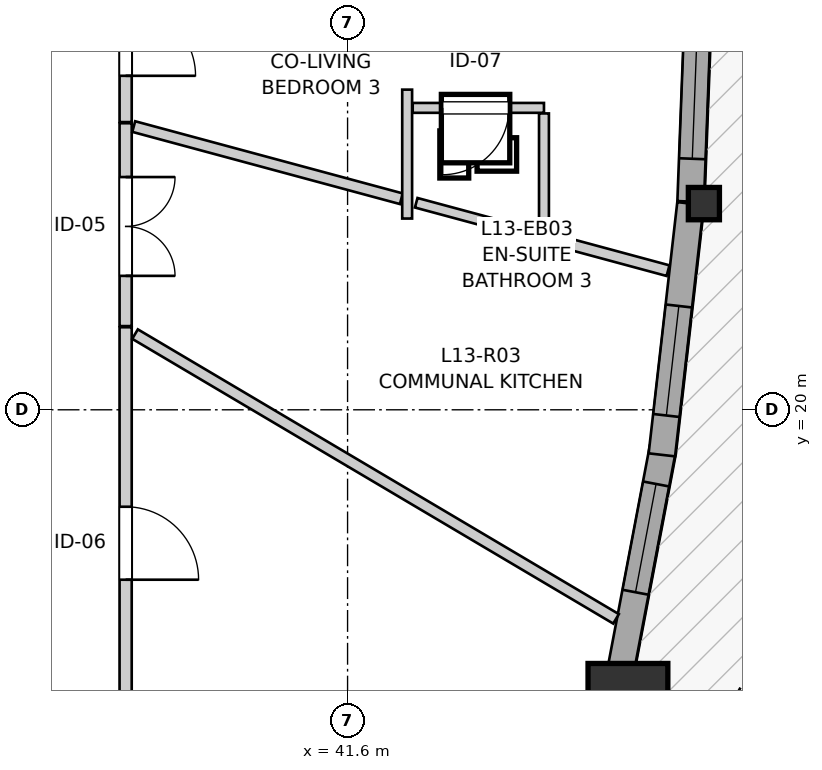
"""IFC4 building model, lengths in metres.
Left out: names, types, materials, properties, quantities, classifications, styles, units other than length and angle.
Written with IfcOpenShell. Run it as: python <this file> out.ifc"""

import sys

from ifc_helpers import new_model, si_unit, direction, frame, frame_2d, origin, origin_2d, place, context, subcontext, project, spatial, rectangle, i_section, extrude, source, transform, mapped, element, fill, save


model = new_model("IFC4")
c1 = context("Model", 3, precision=1e-05, world=origin(), true_north=direction((0.0, 1.0)))
c2 = subcontext(c1, "Body", "Model", "MODEL_VIEW")
j1 = project(units=[si_unit("LENGTHUNIT", "METRE"), si_unit("PLANEANGLEUNIT", "RADIAN")], contexts=[c1])
p1 = place(None, origin())
s1 = spatial("IfcSite", under=j1, at=p1, CompositionType="ELEMENT")
p2 = place(p1, origin())
s2 = spatial("IfcBuilding", under=s1, at=p2, CompositionType="ELEMENT")
p3 = place(p2, frame((0.0, 0.0, 46.2)))
s3 = spatial("IfcBuildingStorey", under=s2, at=p3, CompositionType="ELEMENT", Elevation=46.2)
m1 = source(origin(), c2, "Body", "SweptSolid", [
    extrude(rectangle(XDim=1.05, YDim=1.05, at=origin_2d()), origin(), (0.0, 0.0, 1.0), 2.94),
])
p4 = place(p3, frame((45.289, 16.138, 0.0), z_axis=(0.0, 0.0, 1.0), x_axis=(1.0, 0.0, 0.0)))
e1 = element("IfcColumn", 1, at=p4, inside=s3, PredefinedType="COLUMN", context=c2, shape_type="MappedRepresentation", body=[
    mapped(m1, transform((0.0, 0.0, 0.0), x_axis=(1.0, 0.0, 0.0), y_axis=(0.0, 1.0, 0.0), z_axis=(0.0, 0.0, 1.0), scale=1.0)),
])
m2 = source(origin(), c2, "Body", "SweptSolid", [
    extrude(i_section(OverallWidth=0.409, OverallDepth=0.425, WebThickness=0.03, FlangeThickness=0.048, FilletRadius=0.015, at=origin_2d()), origin(), (0.0, 0.0, 1.0), 2.94),
])
p5 = place(p3, frame((46.288, 22.713, 0.0), z_axis=(0.0, 0.0, 1.0), x_axis=(1.0, 0.0, 0.0)))
e2 = element("IfcColumn", 2, at=p5, inside=s3, PredefinedType="PILASTER", context=c2, shape_type="MappedRepresentation", body=[
    mapped(m2, transform((0.0, 0.0, 0.0), x_axis=(1.0, 0.0, 0.0), y_axis=(0.0, 1.0, 0.0), z_axis=(0.0, 0.0, 1.0), scale=1.0)),
])
p6 = place(p3, frame((45.173, 16.465, 0.0), z_axis=(0.0, 0.0, 1.0), x_axis=(0.186653769851, 0.982425758111, 0.0)))
e3 = element("IfcWall", 3, at=p6, inside=s3, PredefinedType="SOLIDWALL", context=c2, shape_type="SweptSolid", body=[
    extrude(rectangle(XDim=3.084, YDim=0.35, at=frame_2d((1.542, 0.0))), origin(), (0.0, 0.0, 1.0), 2.42),
])
p7 = place(p6, frame((1.155, 0.0, 0.82)))
e4 = element("IfcOpeningElement", 4, at=p7, cuts=e3, PredefinedType="OPENING", context=c2, shape_type="SweptSolid", body=[
    extrude(rectangle(XDim=1.45, YDim=1.25, at=frame_2d((0.725, 0.625))), frame((0.0, 0.185, 0.0), z_axis=(0.0, -1.0, 0.0), x_axis=(1.0, 0.0, 0.0)), (0.0, 0.0, 1.0), 0.37),
])
p8 = place(p3, frame((45.735, 19.407, 0.0), z_axis=(0.0, 0.0, 1.0), x_axis=(0.113314766684, 0.993559139484, 0.0)))
e5 = element("IfcWall", 5, at=p8, inside=s3, PredefinedType="SOLIDWALL", context=c2, shape_type="SweptSolid", body=[
    extrude(rectangle(XDim=3.327, YDim=0.35, at=frame_2d((1.663, 0.0))), origin(), (0.0, 0.0, 1.0), 2.42),
])
p9 = place(p8, frame((0.521, 0.0, 0.82)))
e6 = element("IfcOpeningElement", 6, at=p9, cuts=e5, PredefinedType="OPENING", context=c2, shape_type="SweptSolid", body=[
    extrude(rectangle(XDim=1.45, YDim=1.25, at=frame_2d((0.725, 0.625))), frame((0.0, 0.185, 0.0), z_axis=(0.0, -1.0, 0.0), x_axis=(1.0, 0.0, 0.0)), (0.0, 0.0, 1.0), 0.37),
])
p10 = place(p3, frame((46.114, 22.739, 0.0), z_axis=(0.0, 0.0, 1.0), x_axis=(0.038010770715, 0.999277329529, 0.0)))
e7 = element("IfcWall", 7, at=p10, inside=s3, PredefinedType="SOLIDWALL", context=c2, shape_type="SweptSolid", body=[
    extrude(rectangle(XDim=3.308, YDim=0.35, at=frame_2d((1.654, 0.0))), origin(), (0.0, 0.0, 1.0), 2.42),
])
p11 = place(p10, frame((0.564, 0.0, 0.82)))
e8 = element("IfcOpeningElement", 8, at=p11, cuts=e7, PredefinedType="OPENING", context=c2, shape_type="SweptSolid", body=[
    extrude(rectangle(XDim=2.1, YDim=1.4, at=frame_2d((1.05, 0.7))), frame((0.0, 0.185, 0.0), z_axis=(0.0, -1.0, 0.0), x_axis=(1.0, 0.0, 0.0)), (0.0, 0.0, 1.0), 0.37),
])
p12 = place(p3, frame((38.68, 21.086, 0.0), z_axis=(0.0, 0.0, 1.0), x_axis=(0.0, -1.0, 0.0)))
e9 = element("IfcWall", 9, at=p12, inside=s3, PredefinedType="PARTITIONING", context=c2, shape_type="SweptSolid", body=[
    extrude(rectangle(XDim=5.666, YDim=0.16, at=frame_2d((2.833, 0.0))), origin(), (0.0, 0.0, 1.0), 2.94),
])
p13 = place(p12, frame((2.362, 0.0, 0.0)))
e10 = element("IfcOpeningElement", 10, at=p13, cuts=e9, PredefinedType="OPENING", context=c2, shape_type="SweptSolid", body=[
    extrude(rectangle(XDim=0.96, YDim=2.1, at=frame_2d((0.48, 1.05))), frame((0.0, 0.09, 0.0), z_axis=(0.0, -1.0, 0.0), x_axis=(1.0, 0.0, 0.0)), (0.0, 0.0, 1.0), 0.18),
])
p14 = place(p3, frame((38.68, 23.77, 0.0), z_axis=(0.0, 0.0, 1.0), x_axis=(0.0, -1.0, 0.0)))
e11 = element("IfcWall", 11, at=p14, inside=s3, PredefinedType="PARTITIONING", context=c2, shape_type="SweptSolid", body=[
    extrude(rectangle(XDim=2.669, YDim=0.16, at=frame_2d((1.334, 0.0))), origin(), (0.0, 0.0, 1.0), 2.94),
])
p15 = place(p14, frame((0.708, 0.0, 0.0)))
e12 = element("IfcOpeningElement", 12, at=p15, cuts=e11, PredefinedType="OPENING", context=c2, shape_type="SweptSolid", body=[
    extrude(rectangle(XDim=1.3, YDim=2.1, at=frame_2d((0.65, 1.05))), frame((0.0, 0.09, 0.0), z_axis=(0.0, -1.0, 0.0), x_axis=(1.0, 0.0, 0.0)), (0.0, 0.0, 1.0), 0.18),
])
p16 = place(p3, frame((38.68, 25.968, 0.0), z_axis=(0.0, 0.0, 1.0), x_axis=(0.0, -1.0, 0.0)))
e13 = element("IfcWall", 13, at=p16, inside=s3, PredefinedType="PARTITIONING", context=c2, shape_type="SweptSolid", body=[
    extrude(rectangle(XDim=2.183, YDim=0.16, at=frame_2d((1.092, 0.0))), origin(), (0.0, 0.0, 1.0), 2.94),
])
p17 = place(p16, frame((0.654, 0.0, 0.0)))
e14 = element("IfcOpeningElement", 14, at=p17, cuts=e13, PredefinedType="OPENING", context=c2, shape_type="SweptSolid", body=[
    extrude(rectangle(XDim=0.92, YDim=2.1, at=frame_2d((0.46, 1.05))), frame((0.0, 0.09, 0.0), z_axis=(0.0, -1.0, 0.0), x_axis=(1.0, 0.0, 0.0)), (0.0, 0.0, 1.0), 0.18),
])
p18 = place(p3, frame((44.184, 23.972, 0.0), z_axis=(0.0, 0.0, 1.0), x_axis=(-1.0, 0.0, 0.0)))
e15 = element("IfcWall", 15, at=p18, inside=s3, PredefinedType="PARTITIONING", context=c2, shape_type="SweptSolid", body=[
    extrude(rectangle(XDim=1.727, YDim=0.13, at=frame_2d((0.864, 0.0))), origin(), (0.0, 0.0, 1.0), 2.94),
])
p19 = place(p18, frame((0.46, 0.0, 0.0)))
e16 = element("IfcOpeningElement", 16, at=p19, cuts=e15, PredefinedType="OPENING", context=c2, shape_type="SweptSolid", body=[
    extrude(rectangle(XDim=0.88, YDim=2.05, at=frame_2d((0.44, 1.025))), frame((0.0, 0.075, 0.0), z_axis=(0.0, -1.0, 0.0), x_axis=(1.0, 0.0, 0.0)), (0.0, 0.0, 1.0), 0.15),
])
p20 = place(p3, frame((38.804, 20.996, 0.0), z_axis=(0.0, 0.0, 1.0), x_axis=(0.860541640281, -0.509380099084, 0.0)))
e17 = element("IfcWall", 17, at=p20, inside=s3, PredefinedType="PARTITIONING", context=c2, shape_type="SweptSolid", body=[
    extrude(rectangle(XDim=7.354, YDim=0.145, at=frame_2d((3.677, 0.0))), origin(), (0.0, 0.0, 1.0), 2.94),
])
p21 = place(p3, frame((38.787, 23.726, 0.0), z_axis=(0.0, 0.0, 1.0), x_axis=(0.965490888833, -0.260436832228, 0.0)))
e18 = element("IfcWall", 18, at=p21, inside=s3, PredefinedType="PARTITIONING", context=c2, shape_type="SweptSolid", body=[
    extrude(rectangle(XDim=3.646, YDim=0.145, at=frame_2d((1.823, 0.0))), origin(), (0.0, 0.0, 1.0), 2.94),
])
p22 = place(p3, frame((42.503, 22.724, 0.0), z_axis=(0.0, 0.0, 1.0), x_axis=(0.965583538466, -0.260093118409, 0.0)))
e19 = element("IfcWall", 19, at=p22, inside=s3, PredefinedType="PARTITIONING", context=c2, shape_type="SweptSolid", body=[
    extrude(rectangle(XDim=1.756, YDim=0.13, at=frame_2d((0.878, 0.0))), origin(), (0.0, 0.0, 1.0), 2.94),
])
p23 = place(p3, frame((44.184, 22.364, 0.0), z_axis=(0.0, 0.0, 1.0), x_axis=(0.0, 1.0, 0.0)))
e20 = element("IfcWall", 20, at=p23, inside=s3, PredefinedType="PARTITIONING", context=c2, shape_type="SweptSolid", body=[
    extrude(rectangle(XDim=1.535, YDim=0.13, at=frame_2d((0.768, 0.0))), origin(), (0.0, 0.0, 1.0), 2.94),
])
p24 = place(p3, frame((44.305, 22.238, 0.0), z_axis=(0.0, 0.0, 1.0), x_axis=(0.96544085657, -0.260622240925, 0.0)))
e21 = element("IfcWall", 21, at=p24, inside=s3, PredefinedType="PARTITIONING", context=c2, shape_type="SweptSolid", body=[
    extrude(rectangle(XDim=1.565, YDim=0.145, at=frame_2d((0.783, 0.0))), origin(), (0.0, 0.0, 1.0), 2.94),
])
p25 = place(p3, frame((42.384, 22.516, 0.0), z_axis=(0.0, 0.0, 1.0), x_axis=(0.0, 1.0, 0.0)))
e22 = element("IfcWall", 22, at=p25, inside=s3, PredefinedType="PARTITIONING", context=c2, shape_type="SweptSolid", body=[
    extrude(rectangle(XDim=1.696, YDim=0.13, at=frame_2d((0.848, 0.0))), origin(), (0.0, 0.0, 1.0), 2.94),
])
m3 = source(origin(), c2, "Body", "SweptSolid", [
    extrude(rectangle(XDim=1.45, YDim=1.25, at=frame_2d((0.725, 0.625))), frame((0.0, 0.03, 0.0), z_axis=(0.0, -1.0, 0.0), x_axis=(1.0, 0.0, 0.0)), (0.0, 0.0, 1.0), 0.06),
])
p26 = place(p7, origin())
e23 = element("IfcWindow", 23, at=p26, inside=s3, PartitioningType="SINGLE_PANEL", PredefinedType="WINDOW", context=c2, shape_type="MappedRepresentation", body=[
    mapped(m3, transform((0.0, 0.0, 0.0), x_axis=(1.0, 0.0, 0.0), y_axis=(0.0, 1.0, 0.0), z_axis=(0.0, 0.0, 1.0), scale=1.0)),
])
fill(e4, e23)
p27 = place(p9, origin())
e24 = element("IfcWindow", 24, at=p27, inside=s3, PartitioningType="SINGLE_PANEL", PredefinedType="WINDOW", context=c2, shape_type="MappedRepresentation", body=[
    mapped(m3, transform((0.0, 0.0, 0.0), x_axis=(1.0, 0.0, 0.0), y_axis=(0.0, 1.0, 0.0), z_axis=(0.0, 0.0, 1.0), scale=1.0)),
])
fill(e6, e24)
m4 = source(origin(), c2, "Body", "SweptSolid", [
    extrude(rectangle(XDim=2.1, YDim=1.4, at=frame_2d((1.05, 0.7))), frame((0.0, 0.03, 0.0), z_axis=(0.0, -1.0, 0.0), x_axis=(1.0, 0.0, 0.0)), (0.0, 0.0, 1.0), 0.06),
])
p28 = place(p11, origin())
e25 = element("IfcWindow", 25, at=p28, inside=s3, PartitioningType="SINGLE_PANEL", PredefinedType="WINDOW", context=c2, shape_type="MappedRepresentation", body=[
    mapped(m4, transform((0.0, 0.0, 0.0), x_axis=(1.0, 0.0, 0.0), y_axis=(0.0, 1.0, 0.0), z_axis=(0.0, 0.0, 1.0), scale=1.0)),
])
fill(e8, e25)
m5 = source(origin(), c2, "Body", "SweptSolid", [
    extrude(rectangle(XDim=0.96, YDim=2.1, at=frame_2d((0.48, 1.05))), frame((0.0, 0.025, 0.0), z_axis=(0.0, -1.0, 0.0), x_axis=(1.0, 0.0, 0.0)), (0.0, 0.0, 1.0), 0.05),
])
p29 = place(p13, origin())
e26 = element("IfcDoor", 26, at=p29, inside=s3, OperationType="SINGLE_SWING_RIGHT", PredefinedType="DOOR", context=c2, shape_type="MappedRepresentation", body=[
    mapped(m5, transform((0.0, 0.0, 0.0), x_axis=(1.0, 0.0, 0.0), y_axis=(0.0, 1.0, 0.0), z_axis=(0.0, 0.0, 1.0), scale=1.0)),
])
fill(e10, e26)
m6 = source(origin(), c2, "Body", "SweptSolid", [
    extrude(rectangle(XDim=1.3, YDim=2.1, at=frame_2d((0.65, 1.05))), frame((0.0, 0.025, 0.0), z_axis=(0.0, -1.0, 0.0), x_axis=(1.0, 0.0, 0.0)), (0.0, 0.0, 1.0), 0.05),
])
p30 = place(p15, origin())
e27 = element("IfcDoor", 27, at=p30, inside=s3, OperationType="DOUBLE_DOOR_SINGLE_SWING", PredefinedType="DOOR", context=c2, shape_type="MappedRepresentation", body=[
    mapped(m6, transform((0.0, 0.0, 0.0), x_axis=(1.0, 0.0, 0.0), y_axis=(0.0, 1.0, 0.0), z_axis=(0.0, 0.0, 1.0), scale=1.0)),
])
fill(e12, e27)
m7 = source(origin(), c2, "Body", "SweptSolid", [
    extrude(rectangle(XDim=0.92, YDim=2.1, at=frame_2d((0.46, 1.05))), frame((0.0, 0.025, 0.0), z_axis=(0.0, -1.0, 0.0), x_axis=(1.0, 0.0, 0.0)), (0.0, 0.0, 1.0), 0.05),
])
p31 = place(p17, origin())
e28 = element("IfcDoor", 28, at=p31, inside=s3, OperationType="SINGLE_SWING_RIGHT", PredefinedType="DOOR", context=c2, shape_type="MappedRepresentation", body=[
    mapped(m7, transform((0.0, 0.0, 0.0), x_axis=(1.0, 0.0, 0.0), y_axis=(0.0, 1.0, 0.0), z_axis=(0.0, 0.0, 1.0), scale=1.0)),
])
fill(e14, e28)
m8 = source(origin(), c2, "Body", "SweptSolid", [
    extrude(rectangle(XDim=0.88, YDim=2.05, at=frame_2d((0.44, 1.025))), frame((0.0, 0.025, 0.0), z_axis=(0.0, -1.0, 0.0), x_axis=(1.0, 0.0, 0.0)), (0.0, 0.0, 1.0), 0.05),
])
p32 = place(p19, origin())
e29 = element("IfcDoor", 29, at=p32, inside=s3, OperationType="SINGLE_SWING_RIGHT", PredefinedType="DOOR", context=c2, shape_type="MappedRepresentation", body=[
    mapped(m8, transform((0.0, 0.0, 0.0), x_axis=(1.0, 0.0, 0.0), y_axis=(0.0, 1.0, 0.0), z_axis=(0.0, 0.0, 1.0), scale=1.0)),
])
fill(e16, e29)
save(model, sys.argv[1])
